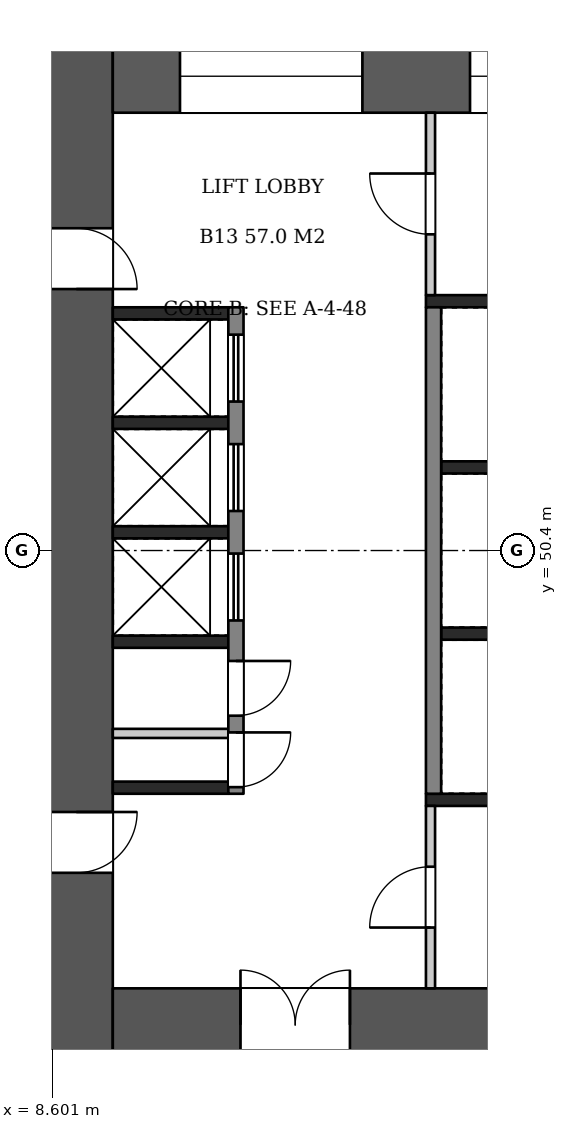
"""IFC4 building model, lengths in metres.
Left out: names, types, materials, properties, quantities, classifications, styles, units other than length and angle.
Written with IfcOpenShell. Run it as: python <this file> out.ifc"""

import sys

from ifc_helpers import new_model, si_unit, direction, frame, frame_2d, origin, place, context, subcontext, project, spatial, rectangle, extrude, element, fill, save


model = new_model("IFC4")
c1 = context("Model", 3, precision=1e-05, world=origin(), true_north=direction((0.0, 1.0)))
c2 = subcontext(c1, "Body", "Model", "MODEL_VIEW")
j1 = project(units=[si_unit("LENGTHUNIT", "METRE"), si_unit("PLANEANGLEUNIT", "RADIAN")], contexts=[c1])
p1 = place(None, origin())
s1 = spatial("IfcSite", under=j1, at=p1, CompositionType="ELEMENT")
p2 = place(p1, origin())
s2 = spatial("IfcBuilding", under=s1, at=p2, CompositionType="ELEMENT")
p3 = place(p2, frame((0.0, 0.0, 56.7)))
s3 = spatial("IfcBuildingStorey", under=s2, at=p3, CompositionType="ELEMENT", Elevation=56.7)
p4 = place(p3, frame((9.0, 58.8, 0.0), z_axis=(0.0, 0.0, 1.0), x_axis=(0.0, -1.0, 0.0)))
e1 = element("IfcWall", 1, at=p4, inside=s3, PredefinedType="SHEAR", context=c2, shape_type="SweptSolid", body=[
    extrude(rectangle(XDim=16.8, YDim=1.2, at=frame_2d((8.4, 0.0))), origin(), (0.0, 0.0, 1.0), 3.22),
])
p5 = place(p4, frame((3.1, 0.0, 0.0)))
e2 = element("IfcOpeningElement", 2, at=p5, cuts=e1, PredefinedType="OPENING", context=c2, shape_type="SweptSolid", body=[
    extrude(rectangle(XDim=1.0, YDim=2.1, at=frame_2d((0.5, 1.05))), frame((0.0, 0.61, 0.0), z_axis=(0.0, -1.0, 0.0), x_axis=(1.0, 0.0, 0.0)), (0.0, 0.0, 1.0), 1.22),
])
p6 = place(p4, frame((12.7, 0.0, 0.0)))
e3 = element("IfcOpeningElement", 3, at=p6, cuts=e1, PredefinedType="OPENING", context=c2, shape_type="SweptSolid", body=[
    extrude(rectangle(XDim=1.0, YDim=2.1, at=frame_2d((0.5, 1.05))), frame((0.0, 0.61, 0.0), z_axis=(0.0, -1.0, 0.0), x_axis=(1.0, 0.0, 0.0)), (0.0, 0.0, 1.0), 1.22),
])
p7 = place(p3, frame((9.6, 58.2, 0.0), z_axis=(0.0, 0.0, 1.0), x_axis=(1.0, 0.0, 0.0)))
e4 = element("IfcWall", 4, at=p7, inside=s3, PredefinedType="SHEAR", context=c2, shape_type="SweptSolid", body=[
    extrude(rectangle(XDim=14.4, YDim=1.2, at=frame_2d((7.2, 0.0))), origin(), (0.0, 0.0, 1.0), 3.22),
])
p8 = place(p7, frame((1.105, 0.0, 0.6)))
e5 = element("IfcOpeningElement", 5, at=p8, cuts=e4, PredefinedType="OPENING", context=c2, shape_type="SweptSolid", body=[
    extrude(rectangle(XDim=3.0, YDim=2.1, at=frame_2d((1.5, 1.05))), frame((0.0, 0.61, 0.0), z_axis=(0.0, -1.0, 0.0), x_axis=(1.0, 0.0, 0.0)), (0.0, 0.0, 1.0), 1.22),
])
p9 = place(p7, frame((5.875, 0.0, 0.6)))
e6 = element("IfcOpeningElement", 6, at=p9, cuts=e4, PredefinedType="OPENING", context=c2, shape_type="SweptSolid", body=[
    extrude(rectangle(XDim=2.4, YDim=2.1, at=frame_2d((1.2, 1.05))), frame((0.0, 0.61, 0.0), z_axis=(0.0, -1.0, 0.0), x_axis=(1.0, 0.0, 0.0)), (0.0, 0.0, 1.0), 1.22),
])
p10 = place(p7, frame((9.993, 0.0, 0.5)))
e7 = element("IfcOpeningElement", 7, at=p10, cuts=e4, PredefinedType="OPENING", context=c2, shape_type="SweptSolid", body=[
    extrude(rectangle(XDim=1.2, YDim=2.4, at=frame_2d((0.6, 1.2))), frame((0.0, 0.61, 0.0), z_axis=(0.0, -1.0, 0.0), x_axis=(1.0, 0.0, 0.0)), (0.0, 0.0, 1.0), 1.22),
])
p11 = place(p7, frame((12.197, 0.0, 0.5)))
e8 = element("IfcOpeningElement", 8, at=p11, cuts=e4, PredefinedType="OPENING", context=c2, shape_type="SweptSolid", body=[
    extrude(rectangle(XDim=1.2, YDim=2.4, at=frame_2d((0.6, 1.2))), frame((0.0, 0.61, 0.0), z_axis=(0.0, -1.0, 0.0), x_axis=(1.0, 0.0, 0.0)), (0.0, 0.0, 1.0), 1.22),
])
p12 = place(p3, frame((9.6, 42.6, 0.0), z_axis=(0.0, 0.0, 1.0), x_axis=(1.0, 0.0, 0.0)))
e9 = element("IfcWall", 9, at=p12, inside=s3, PredefinedType="SHEAR", context=c2, shape_type="SweptSolid", body=[
    extrude(rectangle(XDim=14.4, YDim=1.2, at=frame_2d((7.2, 0.0))), origin(), (0.0, 0.0, 1.0), 3.22),
])
p13 = place(p12, frame((2.1, 0.0, 0.0)))
e10 = element("IfcOpeningElement", 10, at=p13, cuts=e9, PredefinedType="OPENING", context=c2, shape_type="SweptSolid", body=[
    extrude(rectangle(XDim=1.8, YDim=2.1, at=frame_2d((0.9, 1.05))), frame((0.0, 0.61, 0.0), z_axis=(0.0, -1.0, 0.0), x_axis=(1.0, 0.0, 0.0)), (0.0, 0.0, 1.0), 1.22),
])
for number, where, z_axis, x_axis in (
    (11, (9.6, 54.3, 0.0), (0.0, 0.0, 1.0), (1.0, 0.0, 0.0)),
    (12, (9.6, 52.5, 0.0), (0.0, 0.0, 1.0), (1.0, 0.0, 0.0)),
    (13, (9.6, 50.7, 0.0), (0.0, 0.0, 1.0), (1.0, 0.0, 0.0)),
    (14, (9.6, 48.9, 0.0), (0.0, 0.0, 1.0), (1.0, 0.0, 0.0)),
    (15, (9.6, 46.5, 0.0), (0.0, 0.0, 1.0), (1.0, 0.0, 0.0)),
):
    element("IfcWall", number, at=place(p3, frame(where, z_axis=z_axis, x_axis=x_axis)), inside=s3, PredefinedType="SHEAR", context=c2, shape_type="SweptSolid", body=[
        extrude(rectangle(XDim=1.9, YDim=0.2, at=frame_2d((0.95, 0.0))), origin(), (0.0, 0.0, 1.0), 3.22),
    ])
p14 = place(p3, frame((9.6, 47.393, 0.0), z_axis=(0.0, 0.0, 1.0), x_axis=(1.0, 0.0, 0.0)))
e16 = element("IfcWall", 16, at=p14, inside=s3, PredefinedType="PARTITIONING", context=c2, shape_type="SweptSolid", body=[
    extrude(rectangle(XDim=1.9, YDim=0.15, at=frame_2d((0.95, 0.0))), origin(), (0.0, 0.0, 1.0), 3.22),
])
p15 = place(p3, frame((11.625, 54.4, 0.0), z_axis=(0.0, 0.0, 1.0), x_axis=(0.0, -1.0, 0.0)))
e17 = element("IfcWall", 17, at=p15, inside=s3, PredefinedType="SHEAR", context=c2, shape_type="SweptSolid", body=[
    extrude(rectangle(XDim=8.0, YDim=0.25, at=frame_2d((4.0, 0.0))), origin(), (0.0, 0.0, 1.0), 3.22),
])
p16 = place(p15, frame((0.45, 0.0, 0.0)))
e18 = element("IfcOpeningElement", 18, at=p16, cuts=e17, PredefinedType="OPENING", context=c2, shape_type="SweptSolid", body=[
    extrude(rectangle(XDim=1.1, YDim=2.1, at=frame_2d((0.55, 1.05))), frame((0.0, 0.135, 0.0), z_axis=(0.0, -1.0, 0.0), x_axis=(1.0, 0.0, 0.0)), (0.0, 0.0, 1.0), 0.27),
])
p17 = place(p15, frame((2.25, 0.0, 0.0)))
e19 = element("IfcOpeningElement", 19, at=p17, cuts=e17, PredefinedType="OPENING", context=c2, shape_type="SweptSolid", body=[
    extrude(rectangle(XDim=1.1, YDim=2.1, at=frame_2d((0.55, 1.05))), frame((0.0, 0.135, 0.0), z_axis=(0.0, -1.0, 0.0), x_axis=(1.0, 0.0, 0.0)), (0.0, 0.0, 1.0), 0.27),
])
p18 = place(p15, frame((4.05, 0.0, 0.0)))
e20 = element("IfcOpeningElement", 20, at=p18, cuts=e17, PredefinedType="OPENING", context=c2, shape_type="SweptSolid", body=[
    extrude(rectangle(XDim=1.1, YDim=2.1, at=frame_2d((0.55, 1.05))), frame((0.0, 0.135, 0.0), z_axis=(0.0, -1.0, 0.0), x_axis=(1.0, 0.0, 0.0)), (0.0, 0.0, 1.0), 0.27),
])
p19 = place(p15, frame((5.816, 0.0, 0.0)))
e21 = element("IfcOpeningElement", 21, at=p19, cuts=e17, PredefinedType="OPENING", context=c2, shape_type="SweptSolid", body=[
    extrude(rectangle(XDim=0.9, YDim=2.1, at=frame_2d((0.45, 1.05))), frame((0.0, 0.135, 0.0), z_axis=(0.0, -1.0, 0.0), x_axis=(1.0, 0.0, 0.0)), (0.0, 0.0, 1.0), 0.27),
])
p20 = place(p15, frame((6.991, 0.0, 0.0)))
e22 = element("IfcOpeningElement", 22, at=p20, cuts=e17, PredefinedType="OPENING", context=c2, shape_type="SweptSolid", body=[
    extrude(rectangle(XDim=0.9, YDim=2.1, at=frame_2d((0.45, 1.05))), frame((0.0, 0.135, 0.0), z_axis=(0.0, -1.0, 0.0), x_axis=(1.0, 0.0, 0.0)), (0.0, 0.0, 1.0), 0.27),
])
for number, where, z_axis, x_axis in (
    (23, (15.0, 51.767, 0.0), (0.0, 0.0, 1.0), (1.0, 0.0, 0.0)),
    (24, (15.0, 49.033, 0.0), (0.0, 0.0, 1.0), (1.0, 0.0, 0.0)),
):
    element("IfcWall", number, at=place(p3, frame(where, z_axis=z_axis, x_axis=x_axis)), inside=s3, PredefinedType="SHEAR", context=c2, shape_type="SweptSolid", body=[
        extrude(rectangle(XDim=1.9, YDim=0.2, at=frame_2d((0.95, 0.0))), origin(), (0.0, 0.0, 1.0), 3.22),
    ])
p21 = place(p3, frame((14.875, 54.4, 0.0), z_axis=(0.0, 0.0, 1.0), x_axis=(0.0, -1.0, 0.0)))
e25 = element("IfcWall", 25, at=p21, inside=s3, PredefinedType="SHEAR", context=c2, shape_type="SweptSolid", body=[
    extrude(rectangle(XDim=8.0, YDim=0.25, at=frame_2d((4.0, 0.0))), origin(), (0.0, 0.0, 1.0), 3.22),
])
p22 = place(p3, frame((14.75, 54.5, 0.0), z_axis=(0.0, 0.0, 1.0), x_axis=(1.0, 0.0, 0.0)))
e26 = element("IfcWall", 26, at=p22, inside=s3, PredefinedType="SHEAR", context=c2, shape_type="SweptSolid", body=[
    extrude(rectangle(XDim=2.4, YDim=0.2, at=frame_2d((1.2, 0.0))), origin(), (0.0, 0.0, 1.0), 3.22),
])
p23 = place(p3, frame((14.825, 57.6, 0.0), z_axis=(0.0, 0.0, 1.0), x_axis=(0.0, -1.0, 0.0)))
e27 = element("IfcWall", 27, at=p23, inside=s3, PredefinedType="PARTITIONING", context=c2, shape_type="SweptSolid", body=[
    extrude(rectangle(XDim=3.0, YDim=0.15, at=frame_2d((1.5, 0.0))), origin(), (0.0, 0.0, 1.0), 3.22),
])
p24 = place(p23, frame((1.0, 0.0, 0.0)))
e28 = element("IfcOpeningElement", 28, at=p24, cuts=e27, PredefinedType="OPENING", context=c2, shape_type="SweptSolid", body=[
    extrude(rectangle(XDim=1.0, YDim=2.1, at=frame_2d((0.5, 1.05))), frame((0.0, 0.085, 0.0), z_axis=(0.0, -1.0, 0.0), x_axis=(1.0, 0.0, 0.0)), (0.0, 0.0, 1.0), 0.17),
])
p25 = place(p3, frame((14.75, 46.3, 0.0), z_axis=(0.0, 0.0, 1.0), x_axis=(1.0, 0.0, 0.0)))
e29 = element("IfcWall", 29, at=p25, inside=s3, PredefinedType="SHEAR", context=c2, shape_type="SweptSolid", body=[
    extrude(rectangle(XDim=2.4, YDim=0.2, at=frame_2d((1.2, 0.0))), origin(), (0.0, 0.0, 1.0), 3.22),
])
p26 = place(p3, frame((14.825, 46.2, 0.0), z_axis=(0.0, 0.0, 1.0), x_axis=(0.0, -1.0, 0.0)))
e30 = element("IfcWall", 30, at=p26, inside=s3, PredefinedType="PARTITIONING", context=c2, shape_type="SweptSolid", body=[
    extrude(rectangle(XDim=3.0, YDim=0.15, at=frame_2d((1.5, 0.0))), origin(), (0.0, 0.0, 1.0), 3.22),
])
p27 = place(p26, frame((1.0, 0.0, 0.0)))
e31 = element("IfcOpeningElement", 31, at=p27, cuts=e30, PredefinedType="OPENING", context=c2, shape_type="SweptSolid", body=[
    extrude(rectangle(XDim=1.0, YDim=2.1, at=frame_2d((0.5, 1.05))), frame((0.0, 0.085, 0.0), z_axis=(0.0, -1.0, 0.0), x_axis=(1.0, 0.0, 0.0)), (0.0, 0.0, 1.0), 0.17),
])
p28 = place(p5, origin())
e32 = element("IfcDoor", 32, at=p28, inside=s3, OperationType="SINGLE_SWING_RIGHT", PredefinedType="DOOR", context=c2, shape_type="SweptSolid", body=[
    extrude(rectangle(XDim=1.0, YDim=2.1, at=frame_2d((0.5, 1.05))), frame((0.0, 0.025, 0.0), z_axis=(0.0, -1.0, 0.0), x_axis=(1.0, 0.0, 0.0)), (0.0, 0.0, 1.0), 0.05),
])
fill(e2, e32)
p29 = place(p6, origin())
e33 = element("IfcDoor", 33, at=p29, inside=s3, OperationType="SINGLE_SWING_LEFT", PredefinedType="DOOR", context=c2, shape_type="SweptSolid", body=[
    extrude(rectangle(XDim=1.0, YDim=2.1, at=frame_2d((0.5, 1.05))), frame((0.0, 0.025, 0.0), z_axis=(0.0, -1.0, 0.0), x_axis=(1.0, 0.0, 0.0)), (0.0, 0.0, 1.0), 0.05),
])
fill(e3, e33)
p30 = place(p13, origin())
e34 = element("IfcDoor", 34, at=p30, inside=s3, OperationType="DOUBLE_DOOR_SINGLE_SWING", PredefinedType="DOOR", context=c2, shape_type="SweptSolid", body=[
    extrude(rectangle(XDim=1.8, YDim=2.1, at=frame_2d((0.9, 1.05))), frame((0.0, 0.025, 0.0), z_axis=(0.0, -1.0, 0.0), x_axis=(1.0, 0.0, 0.0)), (0.0, 0.0, 1.0), 0.05),
])
fill(e10, e34)
p31 = place(p16, origin())
e35 = element("IfcDoor", 35, at=p31, inside=s3, OperationType="DOUBLE_DOOR_SLIDING", PredefinedType="DOOR", context=c2, shape_type="SweptSolid", body=[
    extrude(rectangle(XDim=1.1, YDim=2.1, at=frame_2d((0.55, 1.05))), frame((0.0, 0.025, 0.0), z_axis=(0.0, -1.0, 0.0), x_axis=(1.0, 0.0, 0.0)), (0.0, 0.0, 1.0), 0.05),
])
fill(e18, e35)
p32 = place(p17, origin())
e36 = element("IfcDoor", 36, at=p32, inside=s3, OperationType="DOUBLE_DOOR_SLIDING", PredefinedType="DOOR", context=c2, shape_type="SweptSolid", body=[
    extrude(rectangle(XDim=1.1, YDim=2.1, at=frame_2d((0.55, 1.05))), frame((0.0, 0.025, 0.0), z_axis=(0.0, -1.0, 0.0), x_axis=(1.0, 0.0, 0.0)), (0.0, 0.0, 1.0), 0.05),
])
fill(e19, e36)
p33 = place(p18, origin())
e37 = element("IfcDoor", 37, at=p33, inside=s3, OperationType="DOUBLE_DOOR_SLIDING", PredefinedType="DOOR", context=c2, shape_type="SweptSolid", body=[
    extrude(rectangle(XDim=1.1, YDim=2.1, at=frame_2d((0.55, 1.05))), frame((0.0, 0.025, 0.0), z_axis=(0.0, -1.0, 0.0), x_axis=(1.0, 0.0, 0.0)), (0.0, 0.0, 1.0), 0.05),
])
fill(e20, e37)
p34 = place(p19, origin())
e38 = element("IfcDoor", 38, at=p34, inside=s3, OperationType="SINGLE_SWING_LEFT", PredefinedType="DOOR", context=c2, shape_type="SweptSolid", body=[
    extrude(rectangle(XDim=0.9, YDim=2.1, at=frame_2d((0.45, 1.05))), frame((0.0, 0.025, 0.0), z_axis=(0.0, -1.0, 0.0), x_axis=(1.0, 0.0, 0.0)), (0.0, 0.0, 1.0), 0.05),
])
fill(e21, e38)
p35 = place(p20, origin())
e39 = element("IfcDoor", 39, at=p35, inside=s3, OperationType="SINGLE_SWING_LEFT", PredefinedType="DOOR", context=c2, shape_type="SweptSolid", body=[
    extrude(rectangle(XDim=0.9, YDim=2.1, at=frame_2d((0.45, 1.05))), frame((0.0, 0.025, 0.0), z_axis=(0.0, -1.0, 0.0), x_axis=(1.0, 0.0, 0.0)), (0.0, 0.0, 1.0), 0.05),
])
fill(e22, e39)
p36 = place(p24, frame((1.0, 0.0, 0.0), z_axis=(0.0, 0.0, 1.0), x_axis=(-1.0, 0.0, 0.0)))
e40 = element("IfcDoor", 40, at=p36, inside=s3, OperationType="SINGLE_SWING_RIGHT", PredefinedType="DOOR", context=c2, shape_type="SweptSolid", body=[
    extrude(rectangle(XDim=1.0, YDim=2.1, at=frame_2d((0.5, 1.05))), frame((0.0, 0.025, 0.0), z_axis=(0.0, -1.0, 0.0), x_axis=(1.0, 0.0, 0.0)), (0.0, 0.0, 1.0), 0.05),
])
fill(e28, e40)
p37 = place(p27, frame((1.0, 0.0, 0.0), z_axis=(0.0, 0.0, 1.0), x_axis=(-1.0, 0.0, 0.0)))
e41 = element("IfcDoor", 41, at=p37, inside=s3, OperationType="SINGLE_SWING_LEFT", PredefinedType="DOOR", context=c2, shape_type="SweptSolid", body=[
    extrude(rectangle(XDim=1.0, YDim=2.1, at=frame_2d((0.5, 1.05))), frame((0.0, 0.025, 0.0), z_axis=(0.0, -1.0, 0.0), x_axis=(1.0, 0.0, 0.0)), (0.0, 0.0, 1.0), 0.05),
])
fill(e31, e41)
p38 = place(p8, origin())
e42 = element("IfcWindow", 42, at=p38, inside=s3, PartitioningType="SINGLE_PANEL", PredefinedType="WINDOW", context=c2, shape_type="SweptSolid", body=[
    extrude(rectangle(XDim=3.0, YDim=2.1, at=frame_2d((1.5, 1.05))), frame((0.0, 0.03, 0.0), z_axis=(0.0, -1.0, 0.0), x_axis=(1.0, 0.0, 0.0)), (0.0, 0.0, 1.0), 0.06),
])
fill(e5, e42)
p39 = place(p9, origin())
e43 = element("IfcWindow", 43, at=p39, inside=s3, PartitioningType="SINGLE_PANEL", PredefinedType="WINDOW", context=c2, shape_type="SweptSolid", body=[
    extrude(rectangle(XDim=2.4, YDim=2.1, at=frame_2d((1.2, 1.05))), frame((0.0, 0.03, 0.0), z_axis=(0.0, -1.0, 0.0), x_axis=(1.0, 0.0, 0.0)), (0.0, 0.0, 1.0), 0.06),
])
fill(e6, e43)
save(model, sys.argv[1])
